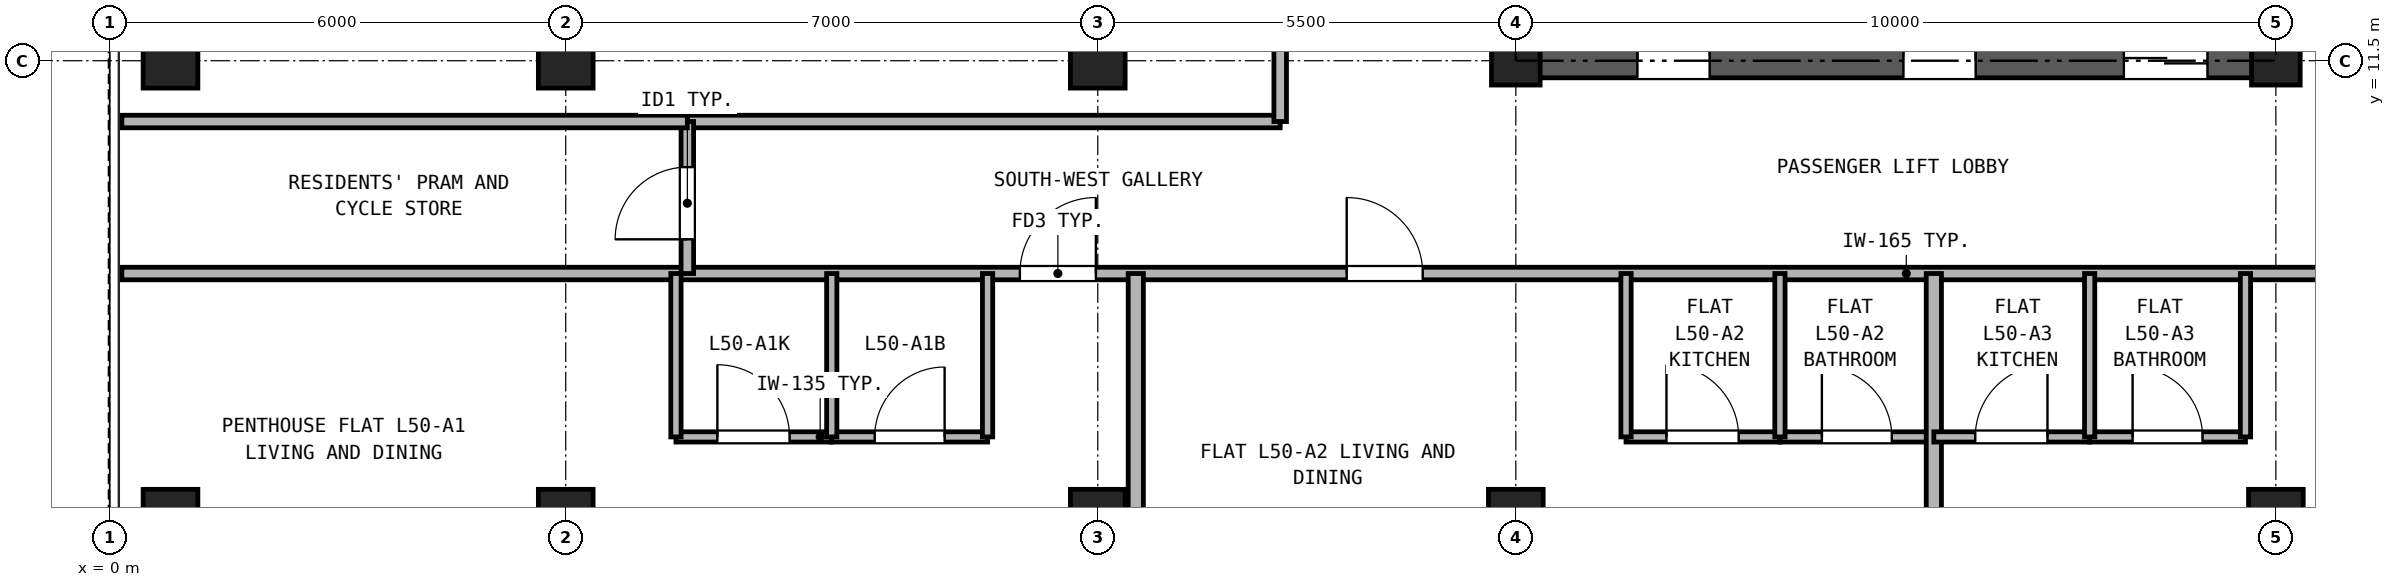
"""IFC4 building model, lengths in metres.
Left out: names, types, materials, properties, quantities, classifications, styles, units other than length and angle.
Written with IfcOpenShell. Run it as: python <this file> out.ifc"""

import sys

from ifc_helpers import new_model, si_unit, direction, frame, frame_2d, origin, origin_2d, place, context, subcontext, project, spatial, rectangle, hollow_rectangle, extrude, source, transform, mapped, element, fill, save


model = new_model("IFC4")
c1 = context("Model", 3, precision=1e-05, world=origin(), true_north=direction((0.0, 1.0)))
c2 = subcontext(c1, "Body", "Model", "MODEL_VIEW")
j1 = project(units=[si_unit("LENGTHUNIT", "METRE"), si_unit("PLANEANGLEUNIT", "RADIAN")], contexts=[c1])
p1 = place(None, origin())
s1 = spatial("IfcSite", under=j1, at=p1, CompositionType="ELEMENT")
p2 = place(p1, origin())
s2 = spatial("IfcBuilding", under=s1, at=p2, CompositionType="ELEMENT")
p3 = place(p2, frame((0.0, 0.0, 178.5)))
s3 = spatial("IfcBuildingStorey", under=s2, at=p3, CompositionType="ELEMENT", Elevation=178.5)
m1 = source(origin(), c2, "Body", "SweptSolid", [
    extrude(hollow_rectangle(XDim=0.72, YDim=0.72, WallThickness=0.04, at=origin_2d()), origin(), (0.0, 0.0, 1.0), 2.95),
])
for number, where, z_axis, x_axis in (
    (1, (0.8, 5.5, 0.0), (0.0, 0.0, 1.0), (1.0, 0.0, 0.0)),
    (2, (0.8, 11.5, 0.0), (0.0, 0.0, 1.0), (1.0, 0.0, 0.0)),
    (3, (6.0, 5.5, 0.0), (0.0, 0.0, 1.0), (1.0, 0.0, 0.0)),
    (4, (6.0, 11.5, 0.0), (0.0, 0.0, 1.0), (1.0, 0.0, 0.0)),
    (5, (13.0, 5.5, 0.0), (0.0, 0.0, 1.0), (1.0, 0.0, 0.0)),
    (6, (13.0, 11.5, 0.0), (0.0, 0.0, 1.0), (1.0, 0.0, 0.0)),
    (7, (18.5, 5.5, 0.0), (0.0, 0.0, 1.0), (1.0, 0.0, 0.0)),
):
    element("IfcColumn", number, at=place(p3, frame(where, z_axis=z_axis, x_axis=x_axis)), inside=s3, PredefinedType="COLUMN", context=c2, shape_type="MappedRepresentation", body=[
        mapped(m1, transform((0.0, 0.0, 0.0), x_axis=(1.0, 0.0, 0.0), y_axis=(0.0, 1.0, 0.0), z_axis=(0.0, 0.0, 1.0), scale=1.0)),
    ])
m2 = source(origin(), c2, "Body", "SweptSolid", [
    extrude(hollow_rectangle(XDim=0.64, YDim=0.64, WallThickness=0.035, at=origin_2d()), origin(), (0.0, 0.0, 1.0), 2.95),
])
p4 = place(p3, frame((18.5, 11.5, 0.0), z_axis=(0.0, 0.0, 1.0), x_axis=(1.0, 0.0, 0.0)))
e8 = element("IfcColumn", 8, at=p4, inside=s3, PredefinedType="COLUMN", context=c2, shape_type="MappedRepresentation", body=[
    mapped(m2, transform((0.0, 0.0, 0.0), x_axis=(1.0, 0.0, 0.0), y_axis=(0.0, 1.0, 0.0), z_axis=(0.0, 0.0, 1.0), scale=1.0)),
])
p5 = place(p3, frame((28.5, 5.5, 0.0), z_axis=(0.0, 0.0, 1.0), x_axis=(1.0, 0.0, 0.0)))
e9 = element("IfcColumn", 9, at=p5, inside=s3, PredefinedType="COLUMN", context=c2, shape_type="MappedRepresentation", body=[
    mapped(m1, transform((0.0, 0.0, 0.0), x_axis=(1.0, 0.0, 0.0), y_axis=(0.0, 1.0, 0.0), z_axis=(0.0, 0.0, 1.0), scale=1.0)),
])
p6 = place(p3, frame((28.5, 11.5, 0.0), z_axis=(0.0, 0.0, 1.0), x_axis=(1.0, 0.0, 0.0)))
e10 = element("IfcColumn", 10, at=p6, inside=s3, PredefinedType="COLUMN", context=c2, shape_type="MappedRepresentation", body=[
    mapped(m2, transform((0.0, 0.0, 0.0), x_axis=(1.0, 0.0, 0.0), y_axis=(0.0, 1.0, 0.0), z_axis=(0.0, 0.0, 1.0), scale=1.0)),
])
p7 = place(p3, frame((18.275, 11.5, 0.0), z_axis=(0.0, 0.0, 1.0), x_axis=(1.0, 0.0, 0.0)))
e11 = element("IfcWall", 11, at=p7, inside=s3, PredefinedType="SHEAR", context=c2, shape_type="SweptSolid", body=[
    extrude(rectangle(XDim=10.45, YDim=0.45, at=frame_2d((5.225, 0.0))), origin(), (0.0, 0.0, 1.0), 2.95),
])
p8 = place(p7, frame((1.825, 0.0, 0.0)))
e12 = element("IfcOpeningElement", 12, at=p8, cuts=e11, PredefinedType="OPENING", context=c2, shape_type="SweptSolid", body=[
    extrude(rectangle(XDim=0.95, YDim=2.15, at=frame_2d((0.475, 1.075))), frame((0.0, 0.235, 0.0), z_axis=(0.0, -1.0, 0.0), x_axis=(1.0, 0.0, 0.0)), (0.0, 0.0, 1.0), 0.47),
])
p9 = place(p7, frame((5.325, 0.0, 0.0)))
e13 = element("IfcOpeningElement", 13, at=p9, cuts=e11, PredefinedType="OPENING", context=c2, shape_type="SweptSolid", body=[
    extrude(rectangle(XDim=0.95, YDim=2.15, at=frame_2d((0.475, 1.075))), frame((0.0, 0.235, 0.0), z_axis=(0.0, -1.0, 0.0), x_axis=(1.0, 0.0, 0.0)), (0.0, 0.0, 1.0), 0.47),
])
p10 = place(p7, frame((8.225, 0.0, 0.0)))
e14 = element("IfcOpeningElement", 14, at=p10, cuts=e11, PredefinedType="OPENING", context=c2, shape_type="SweptSolid", body=[
    extrude(rectangle(XDim=1.1, YDim=2.25, at=frame_2d((0.55, 1.125))), frame((0.0, 0.235, 0.0), z_axis=(0.0, -1.0, 0.0), x_axis=(1.0, 0.0, 0.0)), (0.0, 0.0, 1.0), 0.47),
])
p11 = place(p3, frame((0.16, 8.7, 0.0), z_axis=(0.0, 0.0, 1.0), x_axis=(1.0, 0.0, 0.0)))
e15 = element("IfcWall", 15, at=p11, inside=s3, PredefinedType="PARTITIONING", context=c2, shape_type="SweptSolid", body=[
    extrude(rectangle(XDim=41.48, YDim=0.165, at=frame_2d((20.74, 0.0))), origin(), (0.0, 0.0, 1.0), 2.583),
])
p12 = place(p11, frame((11.815, 0.0, 0.0)))
e16 = element("IfcOpeningElement", 16, at=p12, cuts=e15, PredefinedType="OPENING", context=c2, shape_type="SweptSolid", body=[
    extrude(rectangle(XDim=1.0, YDim=2.15, at=frame_2d((0.5, 1.075))), frame((0.0, 0.093, 0.0), z_axis=(0.0, -1.0, 0.0), x_axis=(1.0, 0.0, 0.0)), (0.0, 0.0, 1.0), 0.185),
])
p13 = place(p11, frame((16.115, 0.0, 0.0)))
e17 = element("IfcOpeningElement", 17, at=p13, cuts=e15, PredefinedType="OPENING", context=c2, shape_type="SweptSolid", body=[
    extrude(rectangle(XDim=1.0, YDim=2.15, at=frame_2d((0.5, 1.075))), frame((0.0, 0.093, 0.0), z_axis=(0.0, -1.0, 0.0), x_axis=(1.0, 0.0, 0.0)), (0.0, 0.0, 1.0), 0.185),
])
p14 = place(p11, frame((29.84, 0.0, 0.0)))
e18 = element("IfcOpeningElement", 18, at=p14, cuts=e15, PredefinedType="OPENING", context=c2, shape_type="SweptSolid", body=[
    extrude(rectangle(XDim=1.0, YDim=2.15, at=frame_2d((0.5, 1.075))), frame((0.0, 0.093, 0.0), z_axis=(0.0, -1.0, 0.0), x_axis=(1.0, 0.0, 0.0)), (0.0, 0.0, 1.0), 0.185),
])
p15 = place(p11, frame((33.615, 0.0, 0.0)))
e19 = element("IfcOpeningElement", 19, at=p15, cuts=e15, PredefinedType="OPENING", context=c2, shape_type="SweptSolid", body=[
    extrude(rectangle(XDim=1.0, YDim=2.15, at=frame_2d((0.5, 1.075))), frame((0.0, 0.093, 0.0), z_axis=(0.0, -1.0, 0.0), x_axis=(1.0, 0.0, 0.0)), (0.0, 0.0, 1.0), 0.185),
])
p16 = place(p3, frame((7.6, 10.7, 0.0), z_axis=(0.0, 0.0, 1.0), x_axis=(1.0, 0.0, 0.0)))
e20 = element("IfcWall", 20, at=p16, inside=s3, PredefinedType="PARTITIONING", context=c2, shape_type="SweptSolid", body=[
    extrude(rectangle(XDim=7.8, YDim=0.165, at=frame_2d((3.9, 0.0))), origin(), (0.0, 0.0, 1.0), 2.95),
])
p17 = place(p3, frame((7.6, 8.7, 0.0), z_axis=(0.0, 0.0, 1.0), x_axis=(0.0, 1.0, 0.0)))
e21 = element("IfcWall", 21, at=p17, inside=s3, PredefinedType="PARTITIONING", context=c2, shape_type="SweptSolid", body=[
    extrude(rectangle(XDim=2.0, YDim=0.165, at=frame_2d((1.0, 0.0))), origin(), (0.0, 0.0, 1.0), 2.95),
])
p18 = place(p17, frame((0.45, 0.0, 0.0)))
e22 = element("IfcOpeningElement", 22, at=p18, cuts=e21, PredefinedType="OPENING", context=c2, shape_type="SweptSolid", body=[
    extrude(rectangle(XDim=0.95, YDim=2.15, at=frame_2d((0.475, 1.075))), frame((0.0, 0.093, 0.0), z_axis=(0.0, -1.0, 0.0), x_axis=(1.0, 0.0, 0.0)), (0.0, 0.0, 1.0), 0.185),
])
p19 = place(p3, frame((15.4, 10.7, 0.0), z_axis=(0.0, 0.0, 1.0), x_axis=(0.0, 1.0, 0.0)))
e23 = element("IfcWall", 23, at=p19, inside=s3, PredefinedType="PARTITIONING", context=c2, shape_type="SweptSolid", body=[
    extrude(rectangle(XDim=24.44, YDim=0.165, at=frame_2d((12.22, 0.0))), origin(), (0.0, 0.0, 1.0), 2.95),
])
p20 = place(p19, frame((4.9, 0.0, 0.0)))
e24 = element("IfcOpeningElement", 24, at=p20, cuts=e23, PredefinedType="OPENING", context=c2, shape_type="SweptSolid", body=[
    extrude(rectangle(XDim=0.95, YDim=2.15, at=frame_2d((0.475, 1.075))), frame((0.0, 0.093, 0.0), z_axis=(0.0, -1.0, 0.0), x_axis=(1.0, 0.0, 0.0)), (0.0, 0.0, 1.0), 0.185),
])
p21 = place(p19, frame((13.8, 0.0, 0.0)))
e25 = element("IfcOpeningElement", 25, at=p21, cuts=e23, PredefinedType="OPENING", context=c2, shape_type="SweptSolid", body=[
    extrude(rectangle(XDim=0.95, YDim=2.15, at=frame_2d((0.475, 1.075))), frame((0.0, 0.093, 0.0), z_axis=(0.0, -1.0, 0.0), x_axis=(1.0, 0.0, 0.0)), (0.0, 0.0, 1.0), 0.185),
])
p22 = place(p19, frame((18.7, 0.0, 0.0)))
e26 = element("IfcOpeningElement", 26, at=p22, cuts=e23, PredefinedType="OPENING", context=c2, shape_type="SweptSolid", body=[
    extrude(rectangle(XDim=0.95, YDim=2.15, at=frame_2d((0.475, 1.075))), frame((0.0, 0.093, 0.0), z_axis=(0.0, -1.0, 0.0), x_axis=(1.0, 0.0, 0.0)), (0.0, 0.0, 1.0), 0.185),
])
p23 = place(p3, frame((7.45, 6.55, 0.0), z_axis=(0.0, 0.0, 1.0), x_axis=(1.0, 0.0, 0.0)))
e27 = element("IfcWall", 27, at=p23, inside=s3, PredefinedType="PARTITIONING", context=c2, shape_type="SweptSolid", body=[
    extrude(rectangle(XDim=2.05, YDim=0.135, at=frame_2d((1.025, 0.0))), origin(), (0.0, 0.0, 1.0), 2.95),
])
p24 = place(p23, frame((0.545, 0.0, 0.0)))
e28 = element("IfcOpeningElement", 28, at=p24, cuts=e27, PredefinedType="OPENING", context=c2, shape_type="SweptSolid", body=[
    extrude(rectangle(XDim=0.95, YDim=2.15, at=frame_2d((0.475, 1.075))), frame((0.0, 0.077, 0.0), z_axis=(0.0, -1.0, 0.0), x_axis=(1.0, 0.0, 0.0)), (0.0, 0.0, 1.0), 0.155),
])
p25 = place(p3, frame((9.5, 6.55, 0.0), z_axis=(0.0, 0.0, 1.0), x_axis=(1.0, 0.0, 0.0)))
e29 = element("IfcWall", 29, at=p25, inside=s3, PredefinedType="PARTITIONING", context=c2, shape_type="SweptSolid", body=[
    extrude(rectangle(XDim=2.05, YDim=0.135, at=frame_2d((1.025, 0.0))), origin(), (0.0, 0.0, 1.0), 2.95),
])
p26 = place(p25, frame((0.565, 0.0, 0.0)))
e30 = element("IfcOpeningElement", 30, at=p26, cuts=e29, PredefinedType="OPENING", context=c2, shape_type="SweptSolid", body=[
    extrude(rectangle(XDim=0.92, YDim=2.1, at=frame_2d((0.46, 1.05))), frame((0.0, 0.077, 0.0), z_axis=(0.0, -1.0, 0.0), x_axis=(1.0, 0.0, 0.0)), (0.0, 0.0, 1.0), 0.155),
])
for number, where, z_axis, x_axis in (
    (31, (7.45, 6.55, 0.0), (0.0, 0.0, 1.0), (0.0, 1.0, 0.0)),
    (32, (9.5, 6.55, 0.0), (0.0, 0.0, 1.0), (0.0, 1.0, 0.0)),
    (33, (11.55, 6.55, 0.0), (0.0, 0.0, 1.0), (0.0, 1.0, 0.0)),
):
    element("IfcWall", number, at=place(p3, frame(where, z_axis=z_axis, x_axis=x_axis)), inside=s3, PredefinedType="PARTITIONING", context=c2, shape_type="SweptSolid", body=[
        extrude(rectangle(XDim=2.15, YDim=0.135, at=frame_2d((1.075, 0.0))), origin(), (0.0, 0.0, 1.0), 2.95),
    ])
p27 = place(p3, frame((13.5, 0.16, 0.0), z_axis=(0.0, 0.0, 1.0), x_axis=(0.0, 1.0, 0.0)))
e34 = element("IfcWall", 34, at=p27, inside=s3, PredefinedType="PARTITIONING", context=c2, shape_type="SweptSolid", body=[
    extrude(rectangle(XDim=8.54, YDim=0.2, at=frame_2d((4.27, 0.0))), origin(), (0.0, 0.0, 1.0), 2.95),
])
p28 = place(p3, frame((19.95, 6.55, 0.0), z_axis=(0.0, 0.0, 1.0), x_axis=(1.0, 0.0, 0.0)))
e35 = element("IfcWall", 35, at=p28, inside=s3, PredefinedType="PARTITIONING", context=c2, shape_type="SweptSolid", body=[
    extrude(rectangle(XDim=2.025, YDim=0.135, at=frame_2d((1.013, 0.0))), origin(), (0.0, 0.0, 1.0), 2.95),
])
p29 = place(p28, frame((0.532, 0.0, 0.0)))
e36 = element("IfcOpeningElement", 36, at=p29, cuts=e35, PredefinedType="OPENING", context=c2, shape_type="SweptSolid", body=[
    extrude(rectangle(XDim=0.95, YDim=2.15, at=frame_2d((0.475, 1.075))), frame((0.0, 0.077, 0.0), z_axis=(0.0, -1.0, 0.0), x_axis=(1.0, 0.0, 0.0)), (0.0, 0.0, 1.0), 0.155),
])
p30 = place(p3, frame((21.975, 6.55, 0.0), z_axis=(0.0, 0.0, 1.0), x_axis=(1.0, 0.0, 0.0)))
e37 = element("IfcWall", 37, at=p30, inside=s3, PredefinedType="PARTITIONING", context=c2, shape_type="SweptSolid", body=[
    extrude(rectangle(XDim=2.025, YDim=0.135, at=frame_2d((1.012, 0.0))), origin(), (0.0, 0.0, 1.0), 2.95),
])
p31 = place(p30, frame((0.552, 0.0, 0.0)))
e38 = element("IfcOpeningElement", 38, at=p31, cuts=e37, PredefinedType="OPENING", context=c2, shape_type="SweptSolid", body=[
    extrude(rectangle(XDim=0.92, YDim=2.1, at=frame_2d((0.46, 1.05))), frame((0.0, 0.077, 0.0), z_axis=(0.0, -1.0, 0.0), x_axis=(1.0, 0.0, 0.0)), (0.0, 0.0, 1.0), 0.155),
])
for number, where, z_axis, x_axis in (
    (39, (19.95, 6.55, 0.0), (0.0, 0.0, 1.0), (0.0, 1.0, 0.0)),
    (40, (21.975, 6.55, 0.0), (0.0, 0.0, 1.0), (0.0, 1.0, 0.0)),
):
    element("IfcWall", number, at=place(p3, frame(where, z_axis=z_axis, x_axis=x_axis)), inside=s3, PredefinedType="PARTITIONING", context=c2, shape_type="SweptSolid", body=[
        extrude(rectangle(XDim=2.15, YDim=0.135, at=frame_2d((1.075, 0.0))), origin(), (0.0, 0.0, 1.0), 2.95),
    ])
p32 = place(p3, frame((24.0, 0.16, 0.0), z_axis=(0.0, 0.0, 1.0), x_axis=(0.0, 1.0, 0.0)))
e41 = element("IfcWall", 41, at=p32, inside=s3, PredefinedType="PARTITIONING", context=c2, shape_type="SweptSolid", body=[
    extrude(rectangle(XDim=8.54, YDim=0.2, at=frame_2d((4.27, 0.0))), origin(), (0.0, 0.0, 1.0), 2.95),
])
p33 = place(p3, frame((24.0, 6.55, 0.0), z_axis=(0.0, 0.0, 1.0), x_axis=(1.0, 0.0, 0.0)))
e42 = element("IfcWall", 42, at=p33, inside=s3, PredefinedType="PARTITIONING", context=c2, shape_type="SweptSolid", body=[
    extrude(rectangle(XDim=2.05, YDim=0.135, at=frame_2d((1.025, 0.0))), origin(), (0.0, 0.0, 1.0), 2.95),
])
p34 = place(p33, frame((0.545, 0.0, 0.0)))
e43 = element("IfcOpeningElement", 43, at=p34, cuts=e42, PredefinedType="OPENING", context=c2, shape_type="SweptSolid", body=[
    extrude(rectangle(XDim=0.95, YDim=2.15, at=frame_2d((0.475, 1.075))), frame((0.0, 0.077, 0.0), z_axis=(0.0, -1.0, 0.0), x_axis=(1.0, 0.0, 0.0)), (0.0, 0.0, 1.0), 0.155),
])
p35 = place(p3, frame((26.05, 6.55, 0.0), z_axis=(0.0, 0.0, 1.0), x_axis=(1.0, 0.0, 0.0)))
e44 = element("IfcWall", 44, at=p35, inside=s3, PredefinedType="PARTITIONING", context=c2, shape_type="SweptSolid", body=[
    extrude(rectangle(XDim=2.05, YDim=0.135, at=frame_2d((1.025, 0.0))), origin(), (0.0, 0.0, 1.0), 2.95),
])
p36 = place(p35, frame((0.565, 0.0, 0.0)))
e45 = element("IfcOpeningElement", 45, at=p36, cuts=e44, PredefinedType="OPENING", context=c2, shape_type="SweptSolid", body=[
    extrude(rectangle(XDim=0.92, YDim=2.1, at=frame_2d((0.46, 1.05))), frame((0.0, 0.077, 0.0), z_axis=(0.0, -1.0, 0.0), x_axis=(1.0, 0.0, 0.0)), (0.0, 0.0, 1.0), 0.155),
])
for number, where, z_axis, x_axis in (
    (46, (26.05, 6.55, 0.0), (0.0, 0.0, 1.0), (0.0, 1.0, 0.0)),
    (47, (28.1, 6.55, 0.0), (0.0, 0.0, 1.0), (0.0, 1.0, 0.0)),
):
    element("IfcWall", number, at=place(p3, frame(where, z_axis=z_axis, x_axis=x_axis)), inside=s3, PredefinedType="PARTITIONING", context=c2, shape_type="SweptSolid", body=[
        extrude(rectangle(XDim=2.15, YDim=0.135, at=frame_2d((1.075, 0.0))), origin(), (0.0, 0.0, 1.0), 2.95),
    ])
p37 = place(p3, frame((0.16, 10.7, 0.0), z_axis=(0.0, 0.0, 1.0), x_axis=(1.0, 0.0, 0.0)))
e48 = element("IfcWall", 48, at=p37, inside=s3, PredefinedType="PARTITIONING", context=c2, shape_type="SweptSolid", body=[
    extrude(rectangle(XDim=7.44, YDim=0.165, at=frame_2d((3.72, 0.0))), origin(), (0.0, 0.0, 1.0), 2.95),
])
p38 = place(p8, frame((0.95, 0.0, 0.0), z_axis=(0.0, 0.0, 1.0), x_axis=(-1.0, 0.0, 0.0)))
e49 = element("IfcDoor", 49, at=p38, inside=s3, OperationType="SINGLE_SWING_LEFT", PredefinedType="DOOR", context=c2, shape_type="SweptSolid", body=[
    extrude(rectangle(XDim=0.95, YDim=2.15, at=frame_2d((0.475, 1.075))), frame((0.0, 0.025, 0.0), z_axis=(0.0, -1.0, 0.0), x_axis=(1.0, 0.0, 0.0)), (0.0, 0.0, 1.0), 0.05),
])
fill(e12, e49)
p39 = place(p9, frame((0.95, 0.0, 0.0), z_axis=(0.0, 0.0, 1.0), x_axis=(-1.0, 0.0, 0.0)))
e50 = element("IfcDoor", 50, at=p39, inside=s3, OperationType="SINGLE_SWING_RIGHT", PredefinedType="DOOR", context=c2, shape_type="SweptSolid", body=[
    extrude(rectangle(XDim=0.95, YDim=2.15, at=frame_2d((0.475, 1.075))), frame((0.0, 0.025, 0.0), z_axis=(0.0, -1.0, 0.0), x_axis=(1.0, 0.0, 0.0)), (0.0, 0.0, 1.0), 0.05),
])
fill(e13, e50)
p40 = place(p10, frame((1.1, 0.0, 0.0), z_axis=(0.0, 0.0, 1.0), x_axis=(-1.0, 0.0, 0.0)))
e51 = element("IfcDoor", 51, at=p40, inside=s3, OperationType="DOUBLE_DOOR_SLIDING", PredefinedType="DOOR", context=c2, shape_type="SweptSolid", body=[
    extrude(rectangle(XDim=1.1, YDim=2.25, at=frame_2d((0.55, 1.125))), frame((0.0, 0.025, 0.0), z_axis=(0.0, -1.0, 0.0), x_axis=(1.0, 0.0, 0.0)), (0.0, 0.0, 1.0), 0.05),
])
fill(e14, e51)
p41 = place(p24, origin())
e52 = element("IfcDoor", 52, at=p41, inside=s3, OperationType="SINGLE_SWING_LEFT", PredefinedType="DOOR", context=c2, shape_type="SweptSolid", body=[
    extrude(rectangle(XDim=0.95, YDim=2.15, at=frame_2d((0.475, 1.075))), frame((0.0, 0.025, 0.0), z_axis=(0.0, -1.0, 0.0), x_axis=(1.0, 0.0, 0.0)), (0.0, 0.0, 1.0), 0.05),
])
fill(e28, e52)
p42 = place(p26, origin())
e53 = element("IfcDoor", 53, at=p42, inside=s3, OperationType="SINGLE_SWING_RIGHT", PredefinedType="DOOR", context=c2, shape_type="SweptSolid", body=[
    extrude(rectangle(XDim=0.92, YDim=2.1, at=frame_2d((0.46, 1.05))), frame((0.0, 0.025, 0.0), z_axis=(0.0, -1.0, 0.0), x_axis=(1.0, 0.0, 0.0)), (0.0, 0.0, 1.0), 0.05),
])
fill(e30, e53)
p43 = place(p12, frame((1.0, 0.0, 0.0), z_axis=(0.0, 0.0, 1.0), x_axis=(-1.0, 0.0, 0.0)))
e54 = element("IfcDoor", 54, at=p43, inside=s3, OperationType="SINGLE_SWING_RIGHT", PredefinedType="DOOR", context=c2, shape_type="SweptSolid", body=[
    extrude(rectangle(XDim=1.0, YDim=2.15, at=frame_2d((0.5, 1.075))), frame((0.0, 0.025, 0.0), z_axis=(0.0, -1.0, 0.0), x_axis=(1.0, 0.0, 0.0)), (0.0, 0.0, 1.0), 0.05),
])
fill(e16, e54)
p44 = place(p29, origin())
e55 = element("IfcDoor", 55, at=p44, inside=s3, OperationType="SINGLE_SWING_LEFT", PredefinedType="DOOR", context=c2, shape_type="SweptSolid", body=[
    extrude(rectangle(XDim=0.95, YDim=2.15, at=frame_2d((0.475, 1.075))), frame((0.0, 0.025, 0.0), z_axis=(0.0, -1.0, 0.0), x_axis=(1.0, 0.0, 0.0)), (0.0, 0.0, 1.0), 0.05),
])
fill(e36, e55)
p45 = place(p31, origin())
e56 = element("IfcDoor", 56, at=p45, inside=s3, OperationType="SINGLE_SWING_LEFT", PredefinedType="DOOR", context=c2, shape_type="SweptSolid", body=[
    extrude(rectangle(XDim=0.92, YDim=2.1, at=frame_2d((0.46, 1.05))), frame((0.0, 0.025, 0.0), z_axis=(0.0, -1.0, 0.0), x_axis=(1.0, 0.0, 0.0)), (0.0, 0.0, 1.0), 0.05),
])
fill(e38, e56)
p46 = place(p13, frame((1.0, 0.0, 0.0), z_axis=(0.0, 0.0, 1.0), x_axis=(-1.0, 0.0, 0.0)))
e57 = element("IfcDoor", 57, at=p46, inside=s3, OperationType="SINGLE_SWING_LEFT", PredefinedType="DOOR", context=c2, shape_type="SweptSolid", body=[
    extrude(rectangle(XDim=1.0, YDim=2.15, at=frame_2d((0.5, 1.075))), frame((0.0, 0.025, 0.0), z_axis=(0.0, -1.0, 0.0), x_axis=(1.0, 0.0, 0.0)), (0.0, 0.0, 1.0), 0.05),
])
fill(e17, e57)
p47 = place(p34, origin())
e58 = element("IfcDoor", 58, at=p47, inside=s3, OperationType="SINGLE_SWING_RIGHT", PredefinedType="DOOR", context=c2, shape_type="SweptSolid", body=[
    extrude(rectangle(XDim=0.95, YDim=2.15, at=frame_2d((0.475, 1.075))), frame((0.0, 0.025, 0.0), z_axis=(0.0, -1.0, 0.0), x_axis=(1.0, 0.0, 0.0)), (0.0, 0.0, 1.0), 0.05),
])
fill(e43, e58)
p48 = place(p36, origin())
e59 = element("IfcDoor", 59, at=p48, inside=s3, OperationType="SINGLE_SWING_LEFT", PredefinedType="DOOR", context=c2, shape_type="SweptSolid", body=[
    extrude(rectangle(XDim=0.92, YDim=2.1, at=frame_2d((0.46, 1.05))), frame((0.0, 0.025, 0.0), z_axis=(0.0, -1.0, 0.0), x_axis=(1.0, 0.0, 0.0)), (0.0, 0.0, 1.0), 0.05),
])
fill(e45, e59)
p49 = place(p18, frame((0.95, 0.0, 0.0), z_axis=(0.0, 0.0, 1.0), x_axis=(-1.0, 0.0, 0.0)))
e60 = element("IfcDoor", 60, at=p49, inside=s3, OperationType="SINGLE_SWING_LEFT", PredefinedType="DOOR", context=c2, shape_type="SweptSolid", body=[
    extrude(rectangle(XDim=0.95, YDim=2.15, at=frame_2d((0.475, 1.075))), frame((0.0, 0.025, 0.0), z_axis=(0.0, -1.0, 0.0), x_axis=(1.0, 0.0, 0.0)), (0.0, 0.0, 1.0), 0.05),
])
fill(e22, e60)
save(model, sys.argv[1])
